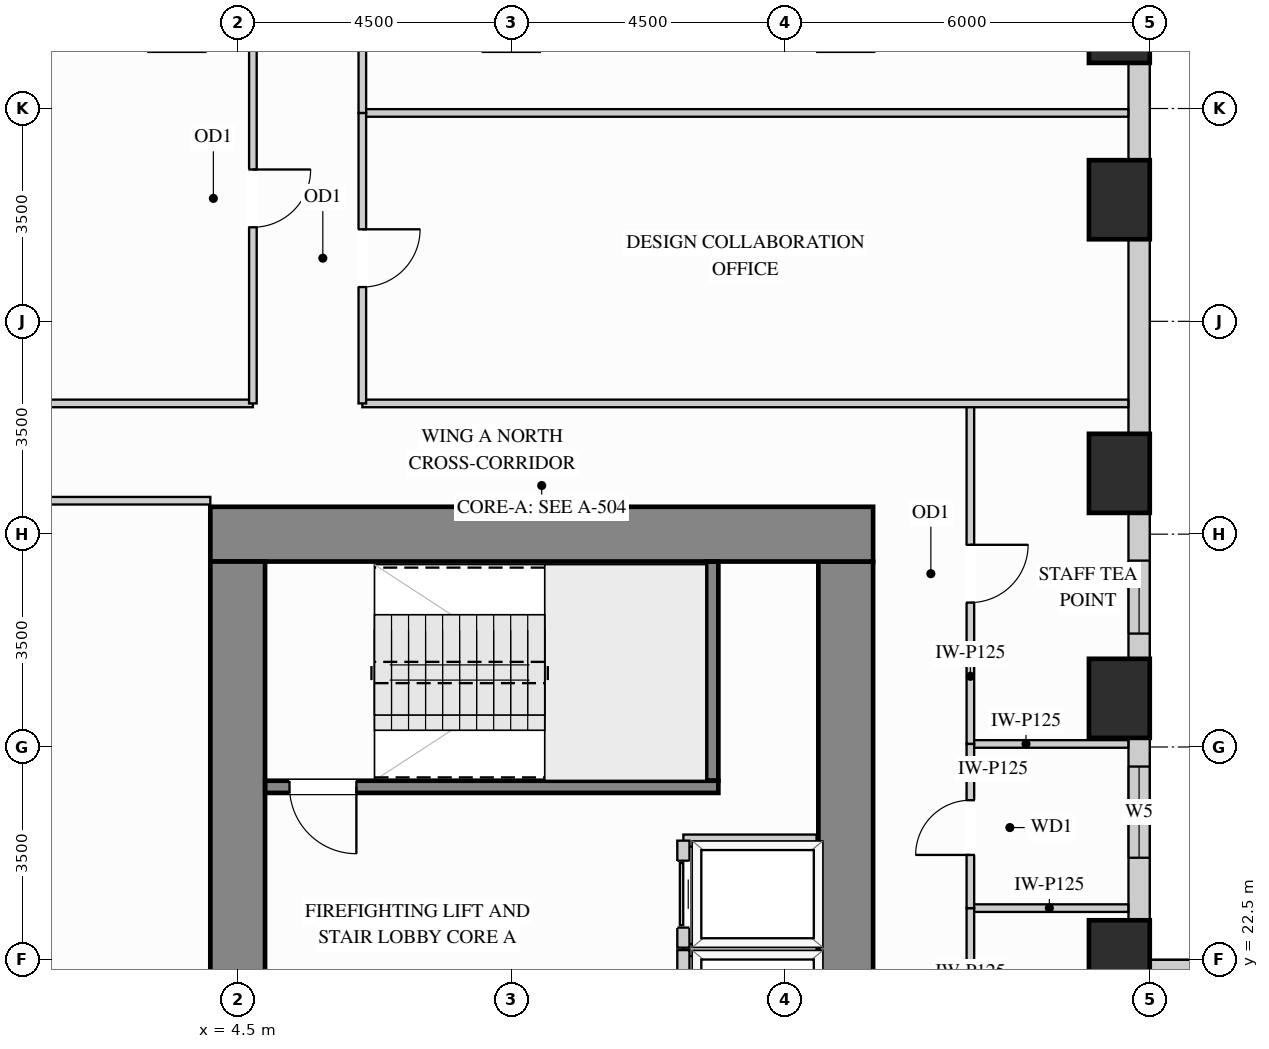
"""IFC4 building model, lengths in metres.
Left out: names, types, materials, properties, quantities, classifications, styles, units other than length and angle.
Written with IfcOpenShell. Run it as: python <this file> out.ifc"""

import sys

from ifc_helpers import new_model, si_unit, direction, frame, frame_2d, origin, origin_2d, place, context, subcontext, project, spatial, rectangle, extrude, source, transform, mapped, element, fill, save


model = new_model("IFC4")
c1 = context("Model", 3, precision=1e-05, world=origin(), true_north=direction((0.0, 1.0)))
c2 = subcontext(c1, "Body", "Model", "MODEL_VIEW")
j1 = project(units=[si_unit("LENGTHUNIT", "METRE"), si_unit("PLANEANGLEUNIT", "RADIAN")], contexts=[c1])
p1 = place(None, origin())
s1 = spatial("IfcSite", under=j1, at=p1, CompositionType="ELEMENT")
p2 = place(p1, origin())
s2 = spatial("IfcBuilding", under=s1, at=p2, CompositionType="ELEMENT")
p3 = place(p2, frame((0.0, 0.0, 22.5)))
s3 = spatial("IfcBuildingStorey", under=s2, at=p3, CompositionType="ELEMENT", Elevation=22.5)
m1 = source(origin(), c2, "Body", "SweptSolid", [
    extrude(rectangle(XDim=1.0, YDim=1.3, at=origin_2d()), origin(), (0.0, 0.0, 1.0), 3.38),
])
for number, where, z_axis, x_axis in (
    (1, (19.0, 22.5, 0.0), (0.0, 0.0, 1.0), (1.0, 0.0, 0.0)),
    (2, (19.0, 26.8, 0.0), (0.0, 0.0, 1.0), (1.0, 0.0, 0.0)),
    (3, (19.0, 30.5, 0.0), (0.0, 0.0, 1.0), (1.0, 0.0, 0.0)),
    (4, (19.0, 35.0, 0.0), (0.0, 0.0, 1.0), (1.0, 0.0, 0.0)),
    (5, (19.0, 37.9, 0.0), (0.0, 0.0, 1.0), (1.0, 0.0, 0.0)),
):
    element("IfcColumn", number, at=place(p3, frame(where, z_axis=z_axis, x_axis=x_axis)), inside=s3, PredefinedType="COLUMN", context=c2, shape_type="MappedRepresentation", body=[
        mapped(m1, transform((0.0, 0.0, 0.0), x_axis=(1.0, 0.0, 0.0), y_axis=(0.0, 1.0, 0.0), z_axis=(0.0, 0.0, 1.0))),
    ])
m2 = source(origin(), c2, "Body", "SweptSolid", [
    extrude(rectangle(XDim=8.17, YDim=0.9, at=frame_2d((4.085, 0.0))), origin(), (0.0, 0.0, 1.0), 3.38),
])
p4 = place(p3, frame((14.5, 20.88, 0.0), z_axis=(0.0, 0.0, 1.0), x_axis=(0.0, 1.0, 0.0)))
e6 = element("IfcWall", 6, at=p4, inside=s3, PredefinedType="SHEAR", context=c2, shape_type="MappedRepresentation", body=[
    mapped(m2, transform((0.0, 0.0, 0.0), x_axis=(1.0, 0.0, 0.0), y_axis=(0.0, 1.0, 0.0), z_axis=(0.0, 0.0, 1.0))),
])
m3 = source(origin(), c2, "Body", "SweptSolid", [
    extrude(rectangle(XDim=10.9, YDim=0.9, at=frame_2d((5.45, 0.0))), origin(), (0.0, 0.0, 1.0), 3.38),
])
p5 = place(p3, frame((4.05, 29.5, 0.0), z_axis=(0.0, 0.0, 1.0), x_axis=(1.0, 0.0, 0.0)))
e7 = element("IfcWall", 7, at=p5, inside=s3, PredefinedType="SHEAR", context=c2, shape_type="MappedRepresentation", body=[
    mapped(m3, transform((0.0, 0.0, 0.0), x_axis=(1.0, 0.0, 0.0), y_axis=(0.0, 1.0, 0.0), z_axis=(0.0, 0.0, 1.0))),
])
m4 = source(origin(), c2, "Body", "SweptSolid", [
    extrude(rectangle(XDim=20.1, YDim=0.9, at=frame_2d((10.05, 0.0))), origin(), (0.0, 0.0, 1.0), 3.38),
])
p6 = place(p3, frame((4.5, 8.95, 0.0), z_axis=(0.0, 0.0, 1.0), x_axis=(0.0, 1.0, 0.0)))
e8 = element("IfcWall", 8, at=p6, inside=s3, PredefinedType="SHEAR", context=c2, shape_type="MappedRepresentation", body=[
    mapped(m4, transform((0.0, 0.0, 0.0), x_axis=(1.0, 0.0, 0.0), y_axis=(0.0, 1.0, 0.0), z_axis=(0.0, 0.0, 1.0))),
])
p7 = place(p3, frame((34.352, 22.325, 0.0), z_axis=(0.0, 0.0, 1.0), x_axis=(-1.0, 0.0, 0.0)))
e9 = element("IfcWall", 9, at=p7, inside=s3, PredefinedType="SOLIDWALL", context=c2, shape_type="SweptSolid", body=[
    extrude(rectangle(XDim=14.854, YDim=0.35, at=frame_2d((7.427, 0.0))), origin(), (0.0, 0.0, 1.0), 3.365),
])
p8 = place(p7, frame((4.058, 0.0, 0.78)))
e10 = element("IfcOpeningElement", 10, at=p8, cuts=e9, PredefinedType="OPENING", context=c2, shape_type="SweptSolid", body=[
    extrude(rectangle(XDim=1.5, YDim=2.0, at=frame_2d((0.75, 1.0))), frame((0.0, 0.185, 0.0), z_axis=(0.0, -1.0, 0.0), x_axis=(1.0, 0.0, 0.0)), (0.0, 0.0, 1.0), 0.37),
])
p9 = place(p7, frame((9.296, 0.0, 0.78)))
e11 = element("IfcOpeningElement", 11, at=p9, cuts=e9, PredefinedType="OPENING", context=c2, shape_type="SweptSolid", body=[
    extrude(rectangle(XDim=1.5, YDim=2.0, at=frame_2d((0.75, 1.0))), frame((0.0, 0.185, 0.0), z_axis=(0.0, -1.0, 0.0), x_axis=(1.0, 0.0, 0.0)), (0.0, 0.0, 1.0), 0.37),
])
p10 = place(p3, frame((19.325, 23.148, 0.0), z_axis=(0.0, 0.0, 1.0), x_axis=(0.0, 1.0, 0.0)))
e12 = element("IfcWall", 12, at=p10, inside=s3, PredefinedType="SOLIDWALL", context=c2, shape_type="SweptSolid", body=[
    extrude(rectangle(XDim=3.004, YDim=0.35, at=frame_2d((1.502, 0.0))), origin(), (0.0, 0.0, 1.0), 2.51),
])
p11 = place(p10, frame((1.031, 0.0, 0.78)))
e13 = element("IfcOpeningElement", 13, at=p11, cuts=e12, PredefinedType="OPENING", context=c2, shape_type="SweptSolid", body=[
    extrude(rectangle(XDim=1.5, YDim=1.55, at=frame_2d((0.75, 0.775))), frame((0.0, 0.185, 0.0), z_axis=(0.0, -1.0, 0.0), x_axis=(1.0, 0.0, 0.0)), (0.0, 0.0, 1.0), 0.37),
])
p12 = place(p3, frame((19.325, 27.448, 0.0), z_axis=(0.0, 0.0, 1.0), x_axis=(0.0, 1.0, 0.0)))
e14 = element("IfcWall", 14, at=p12, inside=s3, PredefinedType="SOLIDWALL", context=c2, shape_type="SweptSolid", body=[
    extrude(rectangle(XDim=2.404, YDim=0.35, at=frame_2d((1.202, 0.0))), origin(), (0.0, 0.0, 1.0), 2.51),
])
p13 = place(p12, frame((0.417, 0.0, 0.78)))
e15 = element("IfcOpeningElement", 15, at=p13, cuts=e14, PredefinedType="OPENING", context=c2, shape_type="SweptSolid", body=[
    extrude(rectangle(XDim=1.2, YDim=1.55, at=frame_2d((0.6, 0.775))), frame((0.0, 0.185, 0.0), z_axis=(0.0, -1.0, 0.0), x_axis=(1.0, 0.0, 0.0)), (0.0, 0.0, 1.0), 0.37),
])
m5 = source(origin(), c2, "Body", "SweptSolid", [
    extrude(rectangle(XDim=3.204, YDim=0.35, at=frame_2d((1.602, 0.0))), origin(), (0.0, 0.0, 1.0), 2.51),
])
p14 = place(p3, frame((19.325, 31.148, 0.0), z_axis=(0.0, 0.0, 1.0), x_axis=(0.0, 1.0, 0.0)))
e16 = element("IfcWall", 16, at=p14, inside=s3, PredefinedType="SOLIDWALL", context=c2, shape_type="MappedRepresentation", body=[
    mapped(m5, transform((0.0, 0.0, 0.0), x_axis=(1.0, 0.0, 0.0), y_axis=(0.0, 1.0, 0.0), z_axis=(0.0, 0.0, 1.0))),
])
m6 = source(origin(), c2, "Body", "SweptSolid", [
    extrude(rectangle(XDim=1.604, YDim=0.35, at=frame_2d((0.802, 0.0))), origin(), (0.0, 0.0, 1.0), 2.51),
])
p15 = place(p3, frame((19.325, 35.648, 0.0), z_axis=(0.0, 0.0, 1.0), x_axis=(0.0, 1.0, 0.0)))
e17 = element("IfcWall", 17, at=p15, inside=s3, PredefinedType="SOLIDWALL", context=c2, shape_type="MappedRepresentation", body=[
    mapped(m6, transform((0.0, 0.0, 0.0), x_axis=(1.0, 0.0, 0.0), y_axis=(0.0, 1.0, 0.0), z_axis=(0.0, 0.0, 1.0))),
])
m7 = source(origin(), c2, "Body", "SweptSolid", [
    extrude(rectangle(XDim=2.598, YDim=0.125, at=frame_2d((1.299, 0.0))), origin(), (0.0, 0.0, 1.0), 3.365),
])
for number, where, z_axis, x_axis in (
    (18, (16.55, 23.35, 0.0), (0.0, 0.0, 1.0), (1.0, 0.0, 0.0)),
    (19, (16.55, 26.05, 0.0), (0.0, 0.0, 1.0), (1.0, 0.0, 0.0)),
):
    element("IfcWall", number, at=place(p3, frame(where, z_axis=z_axis, x_axis=x_axis)), inside=s3, PredefinedType="PARTITIONING", context=c2, shape_type="MappedRepresentation", body=[
        mapped(m7, transform((0.0, 0.0, 0.0), x_axis=(1.0, 0.0, 0.0), y_axis=(0.0, 1.0, 0.0), z_axis=(0.0, 0.0, 1.0))),
    ])
p16 = place(p3, frame((16.55, 16.5, 0.0), z_axis=(0.0, 0.0, 1.0), x_axis=(0.0, 1.0, 0.0)))
e20 = element("IfcWall", 20, at=p16, inside=s3, PredefinedType="PARTITIONING", context=c2, shape_type="SweptSolid", body=[
    extrude(rectangle(XDim=6.85, YDim=0.125, at=frame_2d((3.425, 0.0))), origin(), (0.0, 0.0, 1.0), 3.365),
])
p17 = place(p16, frame((2.95, 0.0, 0.0)))
e21 = element("IfcOpeningElement", 21, at=p17, cuts=e20, PredefinedType="OPENING", context=c2, shape_type="SweptSolid", body=[
    extrude(rectangle(XDim=0.95, YDim=2.15, at=frame_2d((0.475, 1.075))), frame((0.0, 0.073, 0.0), z_axis=(0.0, -1.0, 0.0), x_axis=(1.0, 0.0, 0.0)), (0.0, 0.0, 1.0), 0.145),
])
p18 = place(p3, frame((16.55, 26.05, 0.0), z_axis=(0.0, 0.0, 1.0), x_axis=(0.0, 1.0, 0.0)))
e22 = element("IfcWall", 22, at=p18, inside=s3, PredefinedType="PARTITIONING", context=c2, shape_type="SweptSolid", body=[
    extrude(rectangle(XDim=5.6, YDim=0.125, at=frame_2d((2.8, 0.0))), origin(), (0.0, 0.0, 1.0), 3.365),
])
p19 = place(p18, frame((2.325, 0.0, 0.0)))
e23 = element("IfcOpeningElement", 23, at=p19, cuts=e22, PredefinedType="OPENING", context=c2, shape_type="SweptSolid", body=[
    extrude(rectangle(XDim=0.95, YDim=2.15, at=frame_2d((0.475, 1.075))), frame((0.0, 0.073, 0.0), z_axis=(0.0, -1.0, 0.0), x_axis=(1.0, 0.0, 0.0)), (0.0, 0.0, 1.0), 0.145),
])
p20 = place(p3, frame((16.55, 23.35, 0.0), z_axis=(0.0, 0.0, 1.0), x_axis=(0.0, 1.0, 0.0)))
e24 = element("IfcWall", 24, at=p20, inside=s3, PredefinedType="PARTITIONING", context=c2, shape_type="SweptSolid", body=[
    extrude(rectangle(XDim=2.7, YDim=0.125, at=frame_2d((1.35, 0.0))), origin(), (0.0, 0.0, 1.0), 3.365),
])
p21 = place(p20, frame((0.875, 0.0, 0.0)))
e25 = element("IfcOpeningElement", 25, at=p21, cuts=e24, PredefinedType="OPENING", context=c2, shape_type="SweptSolid", body=[
    extrude(rectangle(XDim=0.9, YDim=2.15, at=frame_2d((0.45, 1.075))), frame((0.0, 0.073, 0.0), z_axis=(0.0, -1.0, 0.0), x_axis=(1.0, 0.0, 0.0)), (0.0, 0.0, 1.0), 0.145),
])
m8 = source(origin(), c2, "Body", "SweptSolid", [
    extrude(rectangle(XDim=12.598, YDim=0.125, at=frame_2d((6.299, 0.0))), origin(), (0.0, 0.0, 1.0), 2.828),
])
for number, where, z_axis, x_axis in (
    (26, (6.55, 36.427, 0.0), (0.0, 0.0, 1.0), (1.0, 0.0, 0.0)),
    (27, (6.55, 31.65, 0.0), (0.0, 0.0, 1.0), (1.0, 0.0, 0.0)),
):
    element("IfcWall", number, at=place(p3, frame(where, z_axis=z_axis, x_axis=x_axis)), inside=s3, PredefinedType="PARTITIONING", context=c2, shape_type="MappedRepresentation", body=[
        mapped(m8, transform((0.0, 0.0, 0.0), x_axis=(1.0, 0.0, 0.0), y_axis=(0.0, 1.0, 0.0), z_axis=(0.0, 0.0, 1.0))),
    ])
m9 = source(origin(), c2, "Body", "SweptSolid", [
    extrude(rectangle(XDim=4.398, YDim=0.125, at=frame_2d((2.199, 0.0))), origin(), (0.0, 0.0, 1.0), 2.828),
])
p22 = place(p3, frame((0.352, 31.65, 0.0), z_axis=(0.0, 0.0, 1.0), x_axis=(1.0, 0.0, 0.0)))
e28 = element("IfcWall", 28, at=p22, inside=s3, PredefinedType="PARTITIONING", context=c2, shape_type="MappedRepresentation", body=[
    mapped(m9, transform((0.0, 0.0, 0.0), x_axis=(1.0, 0.0, 0.0), y_axis=(0.0, 1.0, 0.0), z_axis=(0.0, 0.0, 1.0))),
])
m10 = source(origin(), c2, "Body", "SweptSolid", [
    extrude(rectangle(XDim=2.79, YDim=0.125, at=frame_2d((1.395, 0.0))), origin(), (0.0, 0.0, 1.0), 3.365),
])
p23 = place(p3, frame((1.26, 30.05, 0.0), z_axis=(0.0, 0.0, 1.0), x_axis=(1.0, 0.0, 0.0)))
e29 = element("IfcWall", 29, at=p23, inside=s3, PredefinedType="PARTITIONING", context=c2, shape_type="MappedRepresentation", body=[
    mapped(m10, transform((0.0, 0.0, 0.0), x_axis=(1.0, 0.0, 0.0), y_axis=(0.0, 1.0, 0.0), z_axis=(0.0, 0.0, 1.0))),
])
p24 = place(p3, frame((6.55, 31.65, 0.0), z_axis=(0.0, 0.0, 1.0), x_axis=(0.0, 1.0, 0.0)))
e30 = element("IfcWall", 30, at=p24, inside=s3, PredefinedType="PARTITIONING", context=c2, shape_type="SweptSolid", body=[
    extrude(rectangle(XDim=4.777, YDim=0.125, at=frame_2d((2.389, 0.0))), origin(), (0.0, 0.0, 1.0), 3.365),
])
p25 = place(p24, frame((1.914, 0.0, 0.0)))
e31 = element("IfcOpeningElement", 31, at=p25, cuts=e30, PredefinedType="OPENING", context=c2, shape_type="SweptSolid", body=[
    extrude(rectangle(XDim=0.95, YDim=2.15, at=frame_2d((0.475, 1.075))), frame((0.0, 0.073, 0.0), z_axis=(0.0, -1.0, 0.0), x_axis=(1.0, 0.0, 0.0)), (0.0, 0.0, 1.0), 0.145),
])
p26 = place(p3, frame((6.55, 36.427, 0.0), z_axis=(0.0, 0.0, 1.0), x_axis=(0.0, 1.0, 0.0)))
e32 = element("IfcWall", 32, at=p26, inside=s3, PredefinedType="PARTITIONING", context=c2, shape_type="SweptSolid", body=[
    extrude(rectangle(XDim=4.917, YDim=0.125, at=frame_2d((2.458, 0.0))), origin(), (0.0, 0.0, 1.0), 3.365),
])
p27 = place(p26, frame((1.983, 0.0, 0.0)))
e33 = element("IfcOpeningElement", 33, at=p27, cuts=e32, PredefinedType="OPENING", context=c2, shape_type="SweptSolid", body=[
    extrude(rectangle(XDim=0.95, YDim=2.15, at=frame_2d((0.475, 1.075))), frame((0.0, 0.073, 0.0), z_axis=(0.0, -1.0, 0.0), x_axis=(1.0, 0.0, 0.0)), (0.0, 0.0, 1.0), 0.145),
])
p28 = place(p3, frame((4.75, 31.65, 0.0), z_axis=(0.0, 0.0, 1.0), x_axis=(0.0, 1.0, 0.0)))
e34 = element("IfcWall", 34, at=p28, inside=s3, PredefinedType="PARTITIONING", context=c2, shape_type="SweptSolid", body=[
    extrude(rectangle(XDim=6.744, YDim=0.125, at=frame_2d((3.372, 0.0))), origin(), (0.0, 0.0, 1.0), 3.365),
])
p29 = place(p28, frame((2.897, 0.0, 0.0)))
e35 = element("IfcOpeningElement", 35, at=p29, cuts=e34, PredefinedType="OPENING", context=c2, shape_type="SweptSolid", body=[
    extrude(rectangle(XDim=0.95, YDim=2.15, at=frame_2d((0.475, 1.075))), frame((0.0, 0.073, 0.0), z_axis=(0.0, -1.0, 0.0), x_axis=(1.0, 0.0, 0.0)), (0.0, 0.0, 1.0), 0.145),
])
m11 = source(origin(), c2, "Body", "SweptSolid", [
    extrude(rectangle(XDim=2.19, YDim=0.2, at=frame_2d((1.095, 0.0))), origin(), (0.0, 0.0, 1.0), 3.365),
])
p30 = place(p3, frame((11.83, 22.66, 0.0), z_axis=(0.0, 0.0, 1.0), x_axis=(1.0, 0.0, 0.0)))
e36 = element("IfcWall", 36, at=p30, inside=s3, PredefinedType="PARTITIONING", context=c2, shape_type="MappedRepresentation", body=[
    mapped(m11, transform((0.0, 0.0, 0.0), x_axis=(1.0, 0.0, 0.0), y_axis=(0.0, 1.0, 0.0), z_axis=(0.0, 0.0, 1.0))),
])
p31 = place(p3, frame((11.83, 20.9, 0.0), z_axis=(0.0, 0.0, 1.0), x_axis=(0.0, 1.0, 0.0)))
e37 = element("IfcWall", 37, at=p31, inside=s3, PredefinedType="PARTITIONING", context=c2, shape_type="SweptSolid", body=[
    extrude(rectangle(XDim=1.76, YDim=0.2, at=frame_2d((0.88, 0.0))), origin(), (0.0, 0.0, 1.0), 3.365),
])
p32 = place(p31, frame((0.33, 0.0, 0.0)))
e38 = element("IfcOpeningElement", 38, at=p32, cuts=e37, PredefinedType="OPENING", context=c2, shape_type="SweptSolid", body=[
    extrude(rectangle(XDim=1.1, YDim=2.2, at=frame_2d((0.55, 1.1))), frame((0.0, 0.11, 0.0), z_axis=(0.0, -1.0, 0.0), x_axis=(1.0, 0.0, 0.0)), (0.0, 0.0, 1.0), 0.22),
])
p33 = place(p3, frame((11.83, 24.46, 0.0), z_axis=(0.0, 0.0, 1.0), x_axis=(1.0, 0.0, 0.0)))
e39 = element("IfcWall", 39, at=p33, inside=s3, PredefinedType="PARTITIONING", context=c2, shape_type="MappedRepresentation", body=[
    mapped(m11, transform((0.0, 0.0, 0.0), x_axis=(1.0, 0.0, 0.0), y_axis=(0.0, 1.0, 0.0), z_axis=(0.0, 0.0, 1.0))),
])
p34 = place(p3, frame((11.83, 22.7, 0.0), z_axis=(0.0, 0.0, 1.0), x_axis=(0.0, 1.0, 0.0)))
e40 = element("IfcWall", 40, at=p34, inside=s3, PredefinedType="PARTITIONING", context=c2, shape_type="SweptSolid", body=[
    extrude(rectangle(XDim=1.76, YDim=0.2, at=frame_2d((0.88, 0.0))), origin(), (0.0, 0.0, 1.0), 3.365),
])
p35 = place(p34, frame((0.33, 0.0, 0.0)))
e41 = element("IfcOpeningElement", 41, at=p35, cuts=e40, PredefinedType="OPENING", context=c2, shape_type="SweptSolid", body=[
    extrude(rectangle(XDim=1.1, YDim=2.2, at=frame_2d((0.55, 1.1))), frame((0.0, 0.11, 0.0), z_axis=(0.0, -1.0, 0.0), x_axis=(1.0, 0.0, 0.0)), (0.0, 0.0, 1.0), 0.22),
])
m12 = source(origin(), c2, "Body", "SweptSolid", [
    extrude(rectangle(XDim=3.603, YDim=0.2, at=frame_2d((1.802, 0.0))), origin(), (0.0, 0.0, 1.0), 3.38),
])
p36 = place(p3, frame((12.305, 25.445, 0.0), z_axis=(0.0, 0.0, 1.0), x_axis=(0.0, 1.0, 0.0)))
e42 = element("IfcWall", 42, at=p36, inside=s3, PredefinedType="SHEAR", context=c2, shape_type="MappedRepresentation", body=[
    mapped(m12, transform((0.0, 0.0, 0.0), x_axis=(1.0, 0.0, 0.0), y_axis=(0.0, 1.0, 0.0), z_axis=(0.0, 0.0, 1.0))),
])
p37 = place(p3, frame((4.952, 25.345, 0.0), z_axis=(0.0, 0.0, 1.0), x_axis=(1.0, 0.0, 0.0)))
e43 = element("IfcWall", 43, at=p37, inside=s3, PredefinedType="SHEAR", context=c2, shape_type="SweptSolid", body=[
    extrude(rectangle(XDim=7.453, YDim=0.2, at=frame_2d((3.727, 0.0))), origin(), (0.0, 0.0, 1.0), 3.38),
])
p38 = place(p37, frame((0.4, 0.0, 0.0)))
e44 = element("IfcOpeningElement", 44, at=p38, cuts=e43, PredefinedType="OPENING", context=c2, shape_type="SweptSolid", body=[
    extrude(rectangle(XDim=1.1, YDim=2.15, at=frame_2d((0.55, 1.075))), frame((0.0, 0.11, 0.0), z_axis=(0.0, -1.0, 0.0), x_axis=(1.0, 0.0, 0.0)), (0.0, 0.0, 1.0), 0.22),
])
m13 = source(origin(), c2, "Body", "SweptSolid", [
    extrude(rectangle(XDim=1.1, YDim=2.2, at=frame_2d((0.55, 1.1))), frame((0.0, 0.025, 0.0), z_axis=(0.0, -1.0, 0.0), x_axis=(1.0, 0.0, 0.0)), (0.0, 0.0, 1.0), 0.05),
])
p39 = place(p35, origin())
e45 = element("IfcDoor", 45, at=p39, inside=s3, OperationType="SLIDING_TO_LEFT", PredefinedType="DOOR", context=c2, shape_type="MappedRepresentation", body=[
    mapped(m13, transform((0.0, 0.0, 0.0), x_axis=(1.0, 0.0, 0.0), y_axis=(0.0, 1.0, 0.0), z_axis=(0.0, 0.0, 1.0))),
])
fill(e41, e45)
m14 = source(origin(), c2, "Body", "SweptSolid", [
    extrude(rectangle(XDim=0.95, YDim=2.15, at=frame_2d((0.475, 1.075))), frame((0.0, 0.025, 0.0), z_axis=(0.0, -1.0, 0.0), x_axis=(1.0, 0.0, 0.0)), (0.0, 0.0, 1.0), 0.05),
])
p40 = place(p19, origin())
e46 = element("IfcDoor", 46, at=p40, inside=s3, OperationType="SINGLE_SWING_RIGHT", PredefinedType="DOOR", context=c2, shape_type="MappedRepresentation", body=[
    mapped(m14, transform((0.0, 0.0, 0.0), x_axis=(1.0, 0.0, 0.0), y_axis=(0.0, 1.0, 0.0), z_axis=(0.0, 0.0, 1.0))),
])
fill(e23, e46)
p41 = place(p25, origin())
e47 = element("IfcDoor", 47, at=p41, inside=s3, OperationType="SINGLE_SWING_RIGHT", PredefinedType="DOOR", context=c2, shape_type="MappedRepresentation", body=[
    mapped(m14, transform((0.0, 0.0, 0.0), x_axis=(1.0, 0.0, 0.0), y_axis=(0.0, 1.0, 0.0), z_axis=(0.0, 0.0, 1.0))),
])
fill(e31, e47)
p42 = place(p29, origin())
e48 = element("IfcDoor", 48, at=p42, inside=s3, OperationType="SINGLE_SWING_RIGHT", PredefinedType="DOOR", context=c2, shape_type="MappedRepresentation", body=[
    mapped(m14, transform((0.0, 0.0, 0.0), x_axis=(1.0, 0.0, 0.0), y_axis=(0.0, 1.0, 0.0), z_axis=(0.0, 0.0, 1.0))),
])
fill(e35, e48)
m15 = source(origin(), c2, "Body", "SweptSolid", [
    extrude(rectangle(XDim=1.1, YDim=2.15, at=frame_2d((0.55, 1.075))), frame((0.0, 0.025, 0.0), z_axis=(0.0, -1.0, 0.0), x_axis=(1.0, 0.0, 0.0)), (0.0, 0.0, 1.0), 0.05),
])
p43 = place(p38, origin())
e49 = element("IfcDoor", 49, at=p43, inside=s3, OperationType="SINGLE_SWING_RIGHT", PredefinedType="DOOR", context=c2, shape_type="MappedRepresentation", body=[
    mapped(m15, transform((0.0, 0.0, 0.0), x_axis=(1.0, 0.0, 0.0), y_axis=(0.0, 1.0, 0.0), z_axis=(0.0, 0.0, 1.0))),
])
fill(e44, e49)
m16 = source(origin(), c2, "Body", "SweptSolid", [
    extrude(rectangle(XDim=0.9, YDim=2.15, at=frame_2d((0.45, 1.075))), frame((0.0, 0.025, 0.0), z_axis=(0.0, -1.0, 0.0), x_axis=(1.0, 0.0, 0.0)), (0.0, 0.0, 1.0), 0.05),
])
p44 = place(p21, origin())
e50 = element("IfcDoor", 50, at=p44, inside=s3, OperationType="SINGLE_SWING_LEFT", PredefinedType="DOOR", context=c2, shape_type="MappedRepresentation", body=[
    mapped(m16, transform((0.0, 0.0, 0.0), x_axis=(1.0, 0.0, 0.0), y_axis=(0.0, 1.0, 0.0), z_axis=(0.0, 0.0, 1.0))),
])
fill(e25, e50)
m17 = source(origin(), c2, "Body", "SweptSolid", [
    extrude(rectangle(XDim=1.2, YDim=1.55, at=frame_2d((0.6, 0.775))), frame((0.0, 0.03, 0.0), z_axis=(0.0, -1.0, 0.0), x_axis=(1.0, 0.0, 0.0)), (0.0, 0.0, 1.0), 0.06),
])
p45 = place(p13, origin())
e51 = element("IfcWindow", 51, at=p45, inside=s3, PartitioningType="SINGLE_PANEL", PredefinedType="WINDOW", context=c2, shape_type="MappedRepresentation", body=[
    mapped(m17, transform((0.0, 0.0, 0.0), x_axis=(1.0, 0.0, 0.0), y_axis=(0.0, 1.0, 0.0), z_axis=(0.0, 0.0, 1.0))),
])
fill(e15, e51)
m18 = source(origin(), c2, "Body", "SweptSolid", [
    extrude(rectangle(XDim=1.5, YDim=1.55, at=frame_2d((0.75, 0.775))), frame((0.0, 0.03, 0.0), z_axis=(0.0, -1.0, 0.0), x_axis=(1.0, 0.0, 0.0)), (0.0, 0.0, 1.0), 0.06),
])
p46 = place(p11, origin())
e52 = element("IfcWindow", 52, at=p46, inside=s3, PartitioningType="SINGLE_PANEL", PredefinedType="WINDOW", context=c2, shape_type="MappedRepresentation", body=[
    mapped(m18, transform((0.0, 0.0, 0.0), x_axis=(1.0, 0.0, 0.0), y_axis=(0.0, 1.0, 0.0), z_axis=(0.0, 0.0, 1.0))),
])
fill(e13, e52)
save(model, sys.argv[1])
